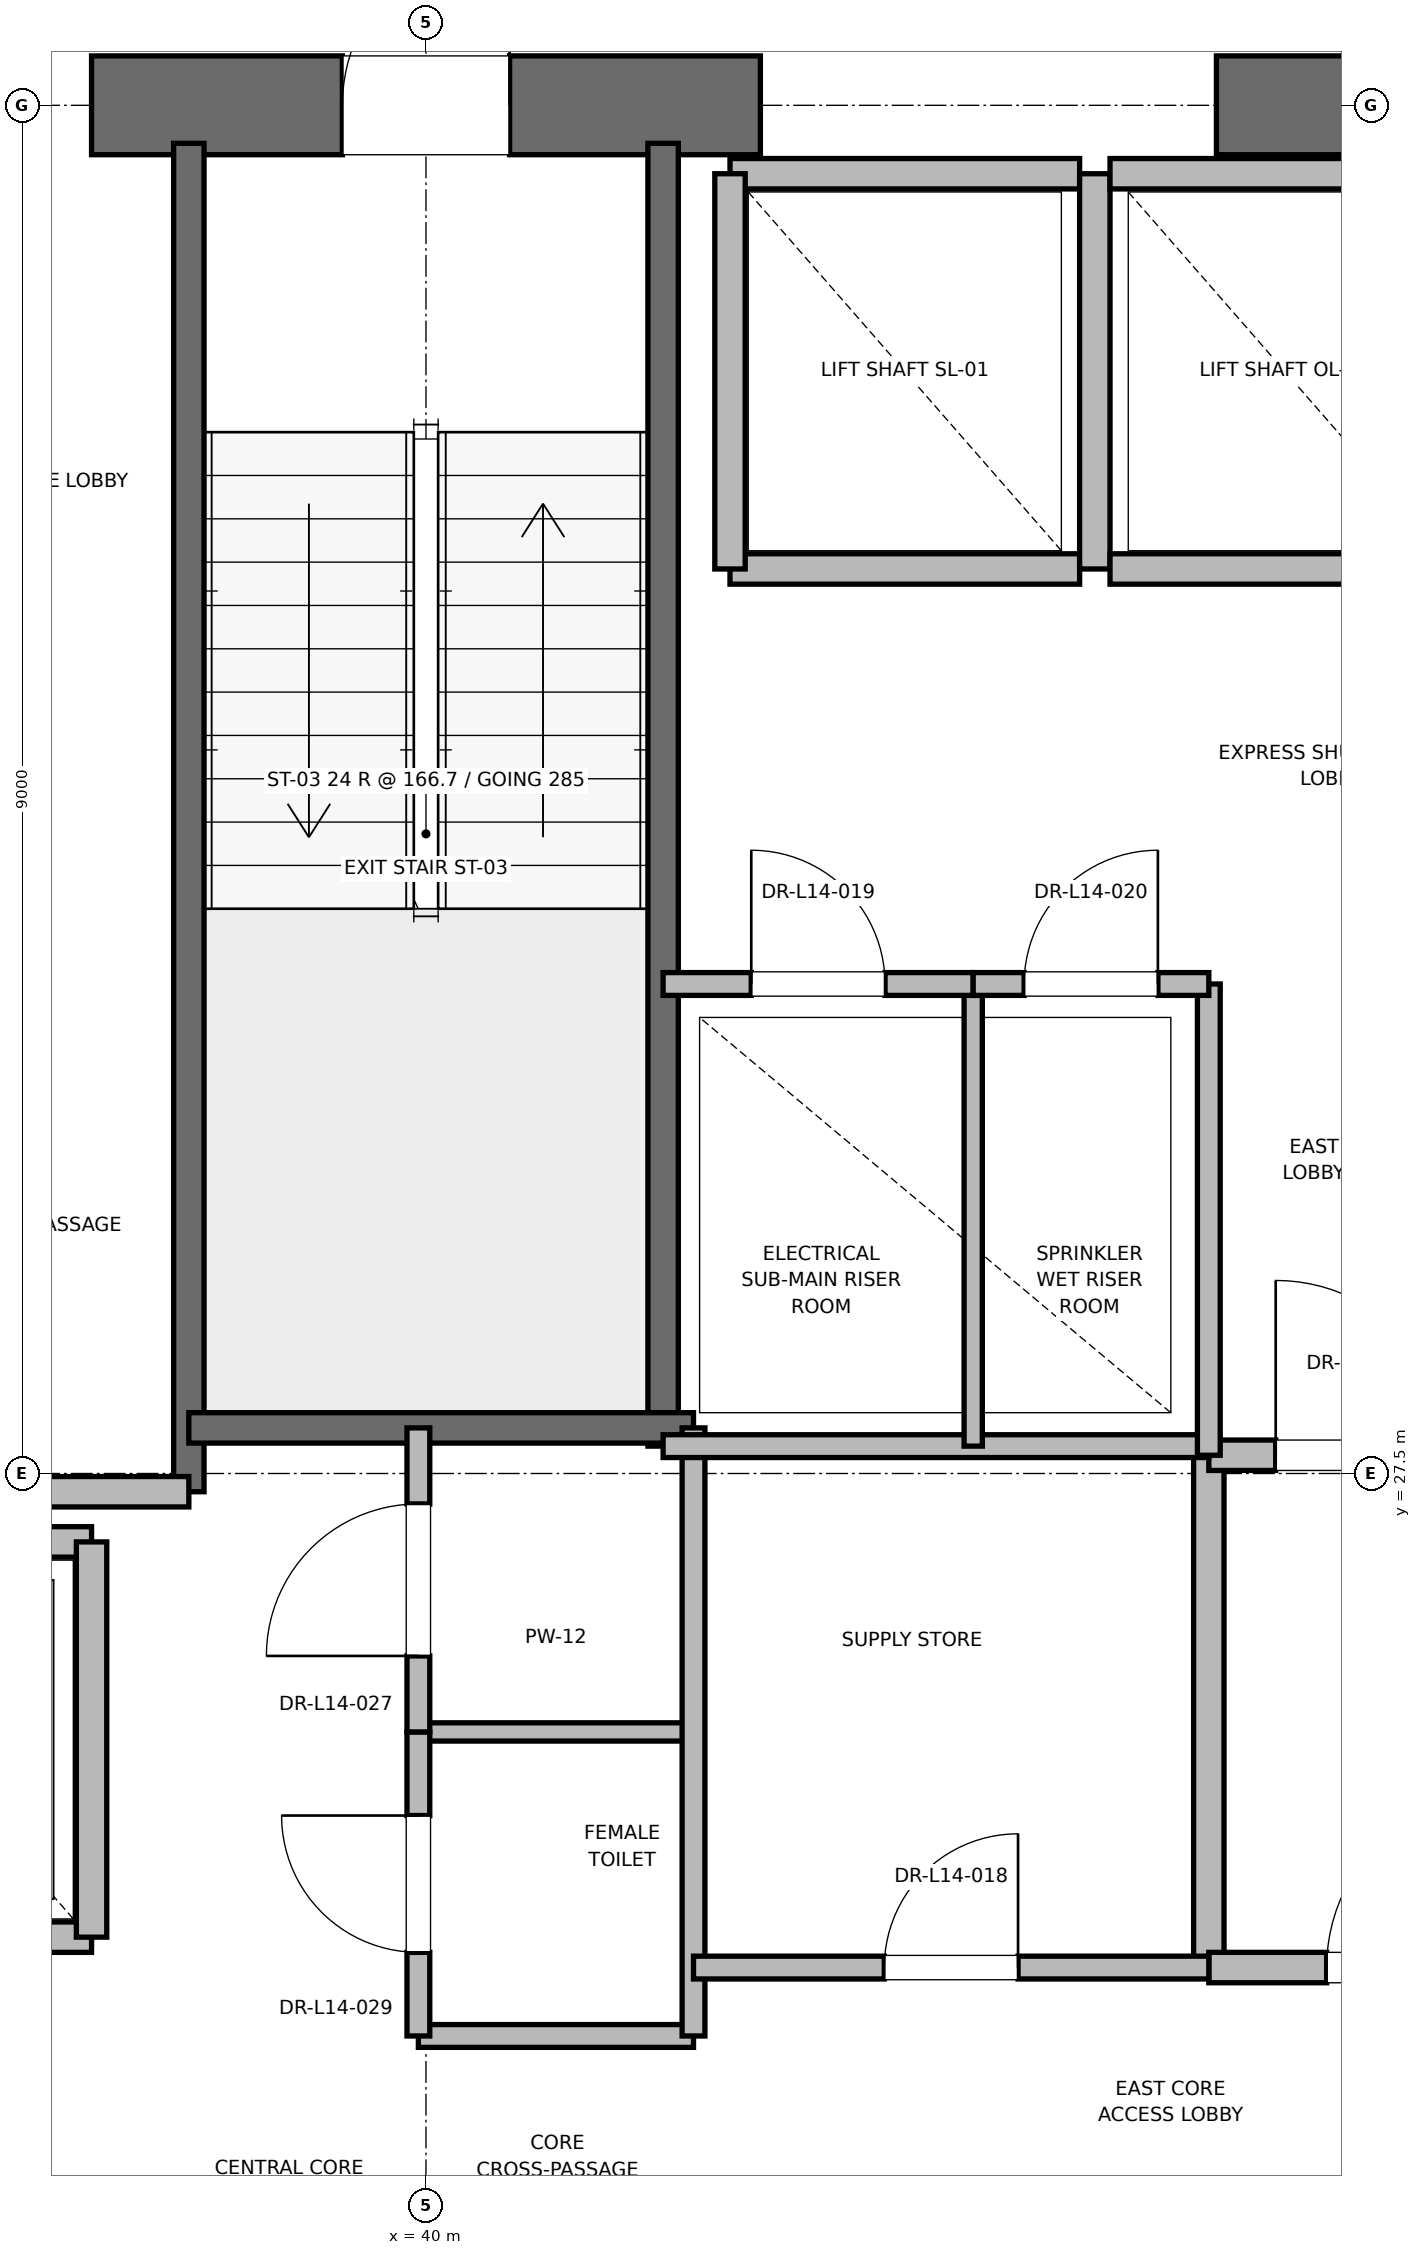
"""IFC4 building model, lengths in metres.
Left out: names, types, materials, properties, quantities, classifications, styles, units other than length and angle.
Written with IfcOpenShell. Run it as: python <this file> out.ifc"""

import sys

from ifc_helpers import new_model, si_unit, direction, frame, frame_2d, origin, place, context, subcontext, project, spatial, rectangle, extrude, element, fill, save


model = new_model("IFC4")
c1 = context("Model", 3, precision=1e-05, world=origin(), true_north=direction((0.0, 1.0)))
c2 = subcontext(c1, "Body", "Model", "MODEL_VIEW")
j1 = project(units=[si_unit("LENGTHUNIT", "METRE"), si_unit("PLANEANGLEUNIT", "RADIAN")], contexts=[c1])
p1 = place(None, origin())
s1 = spatial("IfcSite", under=j1, at=p1, CompositionType="ELEMENT")
p2 = place(p1, origin())
s2 = spatial("IfcBuilding", under=s1, at=p2, CompositionType="ELEMENT")
p3 = place(p2, frame((0.0, 0.0, 63.6)))
s3 = spatial("IfcBuildingStorey", under=s2, at=p3, CompositionType="ELEMENT", Elevation=63.6)
p4 = place(p3, frame((37.8, 36.5, 0.0), z_axis=(0.0, 0.0, 1.0), x_axis=(1.0, 0.0, 0.0)))
e1 = element("IfcWall", 1, at=p4, inside=s3, PredefinedType="SHEAR", context=c2, shape_type="SweptSolid", body=[
    extrude(rectangle(XDim=4.4, YDim=0.65, at=frame_2d((2.2, 0.0))), origin(), (0.0, 0.0, 1.0), 3.76),
])
p5 = place(p4, frame((1.65, 0.0, 0.0)))
e2 = element("IfcOpeningElement", 2, at=p5, cuts=e1, PredefinedType="OPENING", context=c2, shape_type="SweptSolid", body=[
    extrude(rectangle(XDim=1.1, YDim=2.15, at=frame_2d((0.55, 1.075))), frame((0.0, 0.325, 0.0), z_axis=(0.0, -1.0, 0.0), x_axis=(1.0, 0.0, 0.0)), (0.0, 0.0, 1.0), 0.65),
])
p6 = place(p3, frame((45.2, 36.5, 0.0), z_axis=(0.0, 0.0, 1.0), x_axis=(1.0, 0.0, 0.0)))
e3 = element("IfcWall", 3, at=p6, inside=s3, PredefinedType="SHEAR", context=c2, shape_type="SweptSolid", body=[
    extrude(rectangle(XDim=5.8, YDim=0.65, at=frame_2d((2.9, 0.0))), origin(), (0.0, 0.0, 1.0), 3.76),
])
p7 = place(p3, frame((38.44, 27.38, 0.0), z_axis=(0.0, 0.0, 1.0), x_axis=(0.0, 1.0, 0.0)))
e4 = element("IfcWall", 4, at=p7, inside=s3, PredefinedType="SOLIDWALL", context=c2, shape_type="SweptSolid", body=[
    extrude(rectangle(XDim=8.87, YDim=0.2, at=frame_2d((4.435, 0.0))), origin(), (0.0, 0.0, 1.0), 3.76),
])
p8 = place(p3, frame((41.56, 27.68, 0.0), z_axis=(0.0, 0.0, 1.0), x_axis=(0.0, 1.0, 0.0)))
e5 = element("IfcWall", 5, at=p8, inside=s3, PredefinedType="SOLIDWALL", context=c2, shape_type="SweptSolid", body=[
    extrude(rectangle(XDim=8.57, YDim=0.2, at=frame_2d((4.285, 0.0))), origin(), (0.0, 0.0, 1.0), 3.76),
])
p9 = place(p3, frame((38.44, 27.8, 0.0), z_axis=(0.0, 0.0, 1.0), x_axis=(1.0, 0.0, 0.0)))
e6 = element("IfcWall", 6, at=p9, inside=s3, PredefinedType="SOLIDWALL", context=c2, shape_type="SweptSolid", body=[
    extrude(rectangle(XDim=3.32, YDim=0.2, at=frame_2d((1.66, 0.0))), origin(), (0.0, 0.0, 1.0), 3.76),
])
p10 = place(p3, frame((32.82, 27.38, 0.0), z_axis=(0.0, 0.0, 1.0), x_axis=(1.0, 0.0, 0.0)))
e7 = element("IfcWall", 7, at=p10, inside=s3, PredefinedType="PARTITIONING", context=c2, shape_type="SweptSolid", body=[
    extrude(rectangle(XDim=5.62, YDim=0.2, at=frame_2d((2.81, 0.0))), origin(), (0.0, 0.0, 1.0), 3.76),
])
p11 = place(p3, frame((45.15, 24.25, 0.0), z_axis=(0.0, 0.0, 1.0), x_axis=(0.0, 1.0, 0.0)))
e8 = element("IfcWall", 8, at=p11, inside=s3, PredefinedType="PARTITIONING", context=c2, shape_type="SweptSolid", body=[
    extrude(rectangle(XDim=3.37, YDim=0.2, at=frame_2d((1.685, 0.0))), origin(), (0.0, 0.0, 1.0), 3.76),
])
p12 = place(p3, frame((45.15, 24.25, 0.0), z_axis=(0.0, 0.0, 1.0), x_axis=(1.0, 0.0, 0.0)))
e9 = element("IfcWall", 9, at=p12, inside=s3, PredefinedType="PARTITIONING", context=c2, shape_type="SweptSolid", body=[
    extrude(rectangle(XDim=2.7, YDim=0.2, at=frame_2d((1.35, 0.0))), origin(), (0.0, 0.0, 1.0), 3.76),
])
p13 = place(p12, frame((0.775, 0.0, 0.0)))
e10 = element("IfcOpeningElement", 10, at=p13, cuts=e9, PredefinedType="OPENING", context=c2, shape_type="SweptSolid", body=[
    extrude(rectangle(XDim=1.15, YDim=2.2, at=frame_2d((0.575, 1.1))), frame((0.0, 0.1, 0.0), z_axis=(0.0, -1.0, 0.0), x_axis=(1.0, 0.0, 0.0)), (0.0, 0.0, 1.0), 0.2),
])
p14 = place(p3, frame((45.15, 27.62, 0.0), z_axis=(0.0, 0.0, 1.0), x_axis=(1.0, 0.0, 0.0)))
e11 = element("IfcWall", 11, at=p14, inside=s3, PredefinedType="PARTITIONING", context=c2, shape_type="SweptSolid", body=[
    extrude(rectangle(XDim=2.03, YDim=0.2, at=frame_2d((1.015, 0.0))), origin(), (0.0, 0.0, 1.0), 3.76),
])
p15 = place(p14, frame((0.44, 0.0, 0.0)))
e12 = element("IfcOpeningElement", 12, at=p15, cuts=e11, PredefinedType="OPENING", context=c2, shape_type="SweptSolid", body=[
    extrude(rectangle(XDim=1.15, YDim=2.2, at=frame_2d((0.575, 1.1))), frame((0.0, 0.1, 0.0), z_axis=(0.0, -1.0, 0.0), x_axis=(1.0, 0.0, 0.0)), (0.0, 0.0, 1.0), 0.2),
])
p16 = place(p3, frame((35.5, 24.45, 0.0), z_axis=(0.0, 0.0, 1.0), x_axis=(1.0, 0.0, 0.0)))
e13 = element("IfcWall", 13, at=p16, inside=s3, PredefinedType="SOLIDWALL", context=c2, shape_type="SweptSolid", body=[
    extrude(rectangle(XDim=2.3, YDim=0.2, at=frame_2d((1.15, 0.0))), origin(), (0.0, 0.0, 1.0), 3.76),
])
p17 = place(p16, frame((0.6, 0.0, 0.0)))
e14 = element("IfcOpeningElement", 14, at=p17, cuts=e13, PredefinedType="OPENING", context=c2, shape_type="SweptSolid", body=[
    extrude(rectangle(XDim=1.1, YDim=2.2, at=frame_2d((0.55, 1.1))), frame((0.0, 0.1, 0.0), z_axis=(0.0, -1.0, 0.0), x_axis=(1.0, 0.0, 0.0)), (0.0, 0.0, 1.0), 0.2),
])
p18 = place(p3, frame((37.8, 27.05, 0.0), z_axis=(0.0, 0.0, 1.0), x_axis=(-1.0, 0.0, 0.0)))
e15 = element("IfcWall", 15, at=p18, inside=s3, PredefinedType="SOLIDWALL", context=c2, shape_type="SweptSolid", body=[
    extrude(rectangle(XDim=2.3, YDim=0.2, at=frame_2d((1.15, 0.0))), origin(), (0.0, 0.0, 1.0), 3.76),
])
p19 = place(p3, frame((37.8, 24.45, 0.0), z_axis=(0.0, 0.0, 1.0), x_axis=(0.0, 1.0, 0.0)))
e16 = element("IfcWall", 16, at=p19, inside=s3, PredefinedType="SOLIDWALL", context=c2, shape_type="SweptSolid", body=[
    extrude(rectangle(XDim=2.6, YDim=0.2, at=frame_2d((1.3, 0.0))), origin(), (0.0, 0.0, 1.0), 3.76),
])
p20 = place(p3, frame((42.0, 33.45, 0.0), z_axis=(0.0, 0.0, 1.0), x_axis=(1.0, 0.0, 0.0)))
e17 = element("IfcWall", 17, at=p20, inside=s3, PredefinedType="SOLIDWALL", context=c2, shape_type="SweptSolid", body=[
    extrude(rectangle(XDim=2.3, YDim=0.2, at=frame_2d((1.15, 0.0))), origin(), (0.0, 0.0, 1.0), 3.76),
])
p21 = place(p3, frame((44.3, 36.05, 0.0), z_axis=(0.0, 0.0, 1.0), x_axis=(-1.0, 0.0, 0.0)))
e18 = element("IfcWall", 18, at=p21, inside=s3, PredefinedType="SOLIDWALL", context=c2, shape_type="SweptSolid", body=[
    extrude(rectangle(XDim=2.3, YDim=0.2, at=frame_2d((1.15, 0.0))), origin(), (0.0, 0.0, 1.0), 2.54),
])
for number, where, z_axis, x_axis in (
    (19, (42.0, 36.05, 0.0), (0.0, 0.0, 1.0), (0.0, -1.0, 0.0)),
    (20, (44.4, 33.45, 0.0), (0.0, 0.0, 1.0), (0.0, 1.0, 0.0)),
):
    element("IfcWall", number, at=place(p3, frame(where, z_axis=z_axis, x_axis=x_axis)), inside=s3, PredefinedType="SOLIDWALL", context=c2, shape_type="SweptSolid", body=[
        extrude(rectangle(XDim=2.6, YDim=0.2, at=frame_2d((1.3, 0.0))), origin(), (0.0, 0.0, 1.0), 2.54),
    ])
p22 = place(p3, frame((44.5, 33.45, 0.0), z_axis=(0.0, 0.0, 1.0), x_axis=(1.0, 0.0, 0.0)))
e21 = element("IfcWall", 21, at=p22, inside=s3, PredefinedType="SOLIDWALL", context=c2, shape_type="SweptSolid", body=[
    extrude(rectangle(XDim=2.3, YDim=0.2, at=frame_2d((1.15, 0.0))), origin(), (0.0, 0.0, 1.0), 3.76),
])
p23 = place(p3, frame((46.8, 36.05, 0.0), z_axis=(0.0, 0.0, 1.0), x_axis=(-1.0, 0.0, 0.0)))
e22 = element("IfcWall", 22, at=p23, inside=s3, PredefinedType="SOLIDWALL", context=c2, shape_type="SweptSolid", body=[
    extrude(rectangle(XDim=2.3, YDim=0.2, at=frame_2d((1.15, 0.0))), origin(), (0.0, 0.0, 1.0), 2.54),
])
p24 = place(p3, frame((39.95, 23.8, 0.0), z_axis=(0.0, 0.0, 1.0), x_axis=(1.0, 0.0, 0.0)))
e23 = element("IfcWall", 23, at=p24, inside=s3, PredefinedType="PARTITIONING", context=c2, shape_type="SweptSolid", body=[
    extrude(rectangle(XDim=1.81, YDim=0.15, at=frame_2d((0.905, 0.0))), origin(), (0.0, 0.0, 1.0), 2.85),
])
p25 = place(p3, frame((39.95, 25.8, 0.0), z_axis=(0.0, 0.0, 1.0), x_axis=(1.0, 0.0, 0.0)))
e24 = element("IfcWall", 24, at=p25, inside=s3, PredefinedType="PARTITIONING", context=c2, shape_type="SweptSolid", body=[
    extrude(rectangle(XDim=1.81, YDim=0.12, at=frame_2d((0.905, 0.0))), origin(), (0.0, 0.0, 1.0), 2.85),
])
p26 = place(p3, frame((41.76, 23.8, 0.0), z_axis=(0.0, 0.0, 1.0), x_axis=(0.0, 1.0, 0.0)))
e25 = element("IfcWall", 25, at=p26, inside=s3, PredefinedType="PARTITIONING", context=c2, shape_type="SweptSolid", body=[
    extrude(rectangle(XDim=4.0, YDim=0.15, at=frame_2d((2.0, 0.0))), origin(), (0.0, 0.0, 1.0), 2.85),
])
p27 = place(p3, frame((39.95, 23.8, 0.0), z_axis=(0.0, 0.0, 1.0), x_axis=(0.0, 1.0, 0.0)))
e26 = element("IfcWall", 26, at=p27, inside=s3, PredefinedType="PARTITIONING", context=c2, shape_type="SweptSolid", body=[
    extrude(rectangle(XDim=2.0, YDim=0.15, at=frame_2d((1.0, 0.0))), origin(), (0.0, 0.0, 1.0), 2.85),
])
p28 = place(p27, frame((0.55, 0.0, 0.0)))
e27 = element("IfcOpeningElement", 27, at=p28, cuts=e26, PredefinedType="OPENING", context=c2, shape_type="SweptSolid", body=[
    extrude(rectangle(XDim=0.9, YDim=2.1, at=frame_2d((0.45, 1.05))), frame((0.0, 0.075, 0.0), z_axis=(0.0, -1.0, 0.0), x_axis=(1.0, 0.0, 0.0)), (0.0, 0.0, 1.0), 0.15),
])
p29 = place(p3, frame((39.95, 25.8, 0.0), z_axis=(0.0, 0.0, 1.0), x_axis=(0.0, 1.0, 0.0)))
e28 = element("IfcWall", 28, at=p29, inside=s3, PredefinedType="PARTITIONING", context=c2, shape_type="SweptSolid", body=[
    extrude(rectangle(XDim=2.0, YDim=0.15, at=frame_2d((1.0, 0.0))), origin(), (0.0, 0.0, 1.0), 2.85),
])
p30 = place(p29, frame((0.5, 0.0, 0.0)))
e29 = element("IfcOpeningElement", 29, at=p30, cuts=e28, PredefinedType="OPENING", context=c2, shape_type="SweptSolid", body=[
    extrude(rectangle(XDim=1.0, YDim=2.15, at=frame_2d((0.5, 1.075))), frame((0.0, 0.075, 0.0), z_axis=(0.0, -1.0, 0.0), x_axis=(1.0, 0.0, 0.0)), (0.0, 0.0, 1.0), 0.15),
])
p31 = place(p3, frame((41.56, 27.68, 0.0), z_axis=(0.0, 0.0, 1.0), x_axis=(1.0, 0.0, 0.0)))
e30 = element("IfcWall", 30, at=p31, inside=s3, PredefinedType="PARTITIONING", context=c2, shape_type="SweptSolid", body=[
    extrude(rectangle(XDim=3.59, YDim=0.15, at=frame_2d((1.795, 0.0))), origin(), (0.0, 0.0, 1.0), 2.85),
])
p32 = place(p3, frame((41.76, 24.25, 0.0), z_axis=(0.0, 0.0, 1.0), x_axis=(1.0, 0.0, 0.0)))
e31 = element("IfcWall", 31, at=p32, inside=s3, PredefinedType="PARTITIONING", context=c2, shape_type="SweptSolid", body=[
    extrude(rectangle(XDim=3.39, YDim=0.15, at=frame_2d((1.695, 0.0))), origin(), (0.0, 0.0, 1.0), 2.85),
])
p33 = place(p32, frame((1.255, 0.0, 0.0)))
e32 = element("IfcOpeningElement", 32, at=p33, cuts=e31, PredefinedType="OPENING", context=c2, shape_type="SweptSolid", body=[
    extrude(rectangle(XDim=0.88, YDim=2.1, at=frame_2d((0.44, 1.05))), frame((0.0, 0.075, 0.0), z_axis=(0.0, -1.0, 0.0), x_axis=(1.0, 0.0, 0.0)), (0.0, 0.0, 1.0), 0.15),
])
p34 = place(p3, frame((45.15, 27.62, 0.0), z_axis=(0.0, 0.0, 1.0), x_axis=(0.0, 1.0, 0.0)))
e33 = element("IfcWall", 33, at=p34, inside=s3, PredefinedType="PARTITIONING", context=c2, shape_type="SweptSolid", body=[
    extrude(rectangle(XDim=3.1, YDim=0.15, at=frame_2d((1.55, 0.0))), origin(), (0.0, 0.0, 1.0), 2.85),
])
p35 = place(p3, frame((43.6, 27.68, 0.0), z_axis=(0.0, 0.0, 1.0), x_axis=(0.0, 1.0, 0.0)))
e34 = element("IfcWall", 34, at=p35, inside=s3, PredefinedType="PARTITIONING", context=c2, shape_type="SweptSolid", body=[
    extrude(rectangle(XDim=3.04, YDim=0.12, at=frame_2d((1.52, 0.0))), origin(), (0.0, 0.0, 1.0), 2.85),
])
p36 = place(p3, frame((41.56, 30.72, 0.0), z_axis=(0.0, 0.0, 1.0), x_axis=(1.0, 0.0, 0.0)))
e35 = element("IfcWall", 35, at=p36, inside=s3, PredefinedType="PARTITIONING", context=c2, shape_type="SweptSolid", body=[
    extrude(rectangle(XDim=2.04, YDim=0.15, at=frame_2d((1.02, 0.0))), origin(), (0.0, 0.0, 1.0), 2.85),
])
p37 = place(p36, frame((0.58, 0.0, 0.0)))
e36 = element("IfcOpeningElement", 36, at=p37, cuts=e35, PredefinedType="OPENING", context=c2, shape_type="SweptSolid", body=[
    extrude(rectangle(XDim=0.88, YDim=2.1, at=frame_2d((0.44, 1.05))), frame((0.0, 0.075, 0.0), z_axis=(0.0, -1.0, 0.0), x_axis=(1.0, 0.0, 0.0)), (0.0, 0.0, 1.0), 0.15),
])
p38 = place(p3, frame((43.6, 30.72, 0.0), z_axis=(0.0, 0.0, 1.0), x_axis=(1.0, 0.0, 0.0)))
e37 = element("IfcWall", 37, at=p38, inside=s3, PredefinedType="PARTITIONING", context=c2, shape_type="SweptSolid", body=[
    extrude(rectangle(XDim=1.55, YDim=0.15, at=frame_2d((0.775, 0.0))), origin(), (0.0, 0.0, 1.0), 2.85),
])
p39 = place(p38, frame((0.335, 0.0, 0.0)))
e38 = element("IfcOpeningElement", 38, at=p39, cuts=e37, PredefinedType="OPENING", context=c2, shape_type="SweptSolid", body=[
    extrude(rectangle(XDim=0.88, YDim=2.1, at=frame_2d((0.44, 1.05))), frame((0.0, 0.075, 0.0), z_axis=(0.0, -1.0, 0.0), x_axis=(1.0, 0.0, 0.0)), (0.0, 0.0, 1.0), 0.15),
])
p40 = place(p5, origin())
e39 = element("IfcDoor", 39, at=p40, inside=s3, OperationType="SINGLE_SWING_RIGHT", PredefinedType="DOOR", context=c2, shape_type="SweptSolid", body=[
    extrude(rectangle(XDim=1.1, YDim=2.15, at=frame_2d((0.55, 1.075))), frame((0.0, 0.025, 0.0), z_axis=(0.0, -1.0, 0.0), x_axis=(1.0, 0.0, 0.0)), (0.0, 0.0, 1.0), 0.05),
])
fill(e2, e39)
p41 = place(p13, origin())
e40 = element("IfcDoor", 40, at=p41, inside=s3, OperationType="SINGLE_SWING_RIGHT", PredefinedType="DOOR", context=c2, shape_type="SweptSolid", body=[
    extrude(rectangle(XDim=1.15, YDim=2.2, at=frame_2d((0.575, 1.1))), frame((0.0, 0.025, 0.0), z_axis=(0.0, -1.0, 0.0), x_axis=(1.0, 0.0, 0.0)), (0.0, 0.0, 1.0), 0.05),
])
fill(e10, e40)
p42 = place(p15, origin())
e41 = element("IfcDoor", 41, at=p42, inside=s3, OperationType="SINGLE_SWING_LEFT", PredefinedType="DOOR", context=c2, shape_type="SweptSolid", body=[
    extrude(rectangle(XDim=1.15, YDim=2.2, at=frame_2d((0.575, 1.1))), frame((0.0, 0.025, 0.0), z_axis=(0.0, -1.0, 0.0), x_axis=(1.0, 0.0, 0.0)), (0.0, 0.0, 1.0), 0.05),
])
fill(e12, e41)
p43 = place(p28, origin())
e42 = element("IfcDoor", 42, at=p43, inside=s3, OperationType="SINGLE_SWING_RIGHT", PredefinedType="DOOR", context=c2, shape_type="SweptSolid", body=[
    extrude(rectangle(XDim=0.9, YDim=2.1, at=frame_2d((0.45, 1.05))), frame((0.0, 0.025, 0.0), z_axis=(0.0, -1.0, 0.0), x_axis=(1.0, 0.0, 0.0)), (0.0, 0.0, 1.0), 0.05),
])
fill(e27, e42)
p44 = place(p30, origin())
e43 = element("IfcDoor", 43, at=p44, inside=s3, OperationType="SINGLE_SWING_LEFT", PredefinedType="DOOR", context=c2, shape_type="SweptSolid", body=[
    extrude(rectangle(XDim=1.0, YDim=2.15, at=frame_2d((0.5, 1.075))), frame((0.0, 0.025, 0.0), z_axis=(0.0, -1.0, 0.0), x_axis=(1.0, 0.0, 0.0)), (0.0, 0.0, 1.0), 0.05),
])
fill(e29, e43)
p45 = place(p33, origin())
e44 = element("IfcDoor", 44, at=p45, inside=s3, OperationType="SINGLE_SWING_RIGHT", PredefinedType="DOOR", context=c2, shape_type="SweptSolid", body=[
    extrude(rectangle(XDim=0.88, YDim=2.1, at=frame_2d((0.44, 1.05))), frame((0.0, 0.025, 0.0), z_axis=(0.0, -1.0, 0.0), x_axis=(1.0, 0.0, 0.0)), (0.0, 0.0, 1.0), 0.05),
])
fill(e32, e44)
p46 = place(p37, origin())
e45 = element("IfcDoor", 45, at=p46, inside=s3, OperationType="SINGLE_SWING_LEFT", PredefinedType="DOOR", context=c2, shape_type="SweptSolid", body=[
    extrude(rectangle(XDim=0.88, YDim=2.1, at=frame_2d((0.44, 1.05))), frame((0.0, 0.025, 0.0), z_axis=(0.0, -1.0, 0.0), x_axis=(1.0, 0.0, 0.0)), (0.0, 0.0, 1.0), 0.05),
])
fill(e36, e45)
p47 = place(p39, origin())
e46 = element("IfcDoor", 46, at=p47, inside=s3, OperationType="SINGLE_SWING_RIGHT", PredefinedType="DOOR", context=c2, shape_type="SweptSolid", body=[
    extrude(rectangle(XDim=0.88, YDim=2.1, at=frame_2d((0.44, 1.05))), frame((0.0, 0.025, 0.0), z_axis=(0.0, -1.0, 0.0), x_axis=(1.0, 0.0, 0.0)), (0.0, 0.0, 1.0), 0.05),
])
fill(e38, e46)
save(model, sys.argv[1])
